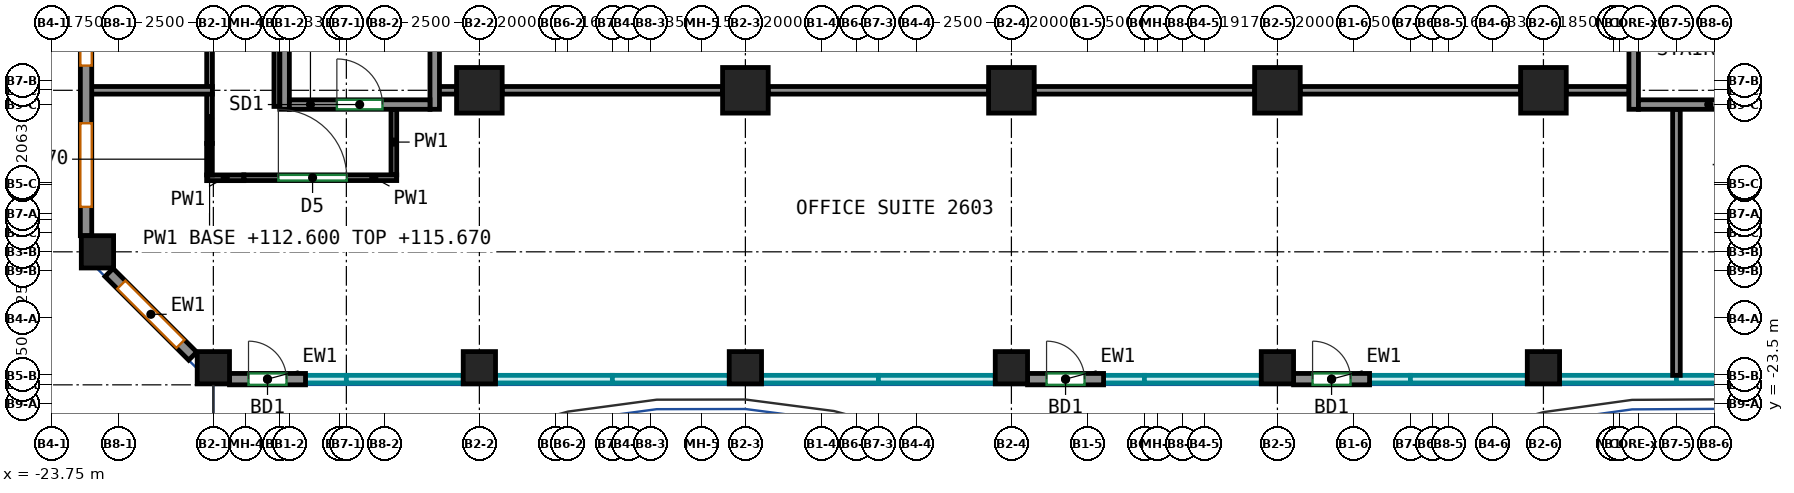
"""IFC4 building model, lengths in metres.
Left out: names, types, materials, properties, quantities, classifications, styles, units other than length and angle.
Written with IfcOpenShell. Run it as: python <this file> out.ifc"""

import sys

from ifc_helpers import new_model, si_unit, direction, frame, frame_2d, origin, origin_2d, place, context, subcontext, project, spatial, rectangle, extrude, source, transform, mapped, element, fill, save


model = new_model("IFC4")
c1 = context("Model", 3, precision=1e-05, world=origin(), true_north=direction((0.0, 1.0)))
c2 = subcontext(c1, "Body", "Model", "MODEL_VIEW")
j1 = project(units=[si_unit("LENGTHUNIT", "METRE"), si_unit("PLANEANGLEUNIT", "RADIAN")], contexts=[c1])
p1 = place(None, origin())
s1 = spatial("IfcSite", under=j1, at=p1, CompositionType="ELEMENT")
p2 = place(p1, origin())
s2 = spatial("IfcBuilding", under=s1, at=p2, CompositionType="ELEMENT")
p3 = place(p2, frame((0.0, 0.0, 112.6)))
s3 = spatial("IfcBuildingStorey", under=s2, at=p3, CompositionType="ELEMENT", Elevation=112.6)
m1 = source(origin(), c2, "Body", "SweptSolid", [
    extrude(rectangle(XDim=0.85, YDim=0.85, at=origin_2d()), origin(), (0.0, 0.0, 1.0), 3.72),
])
for number, where, z_axis, x_axis in (
    (1, (-22.55, -19.5, 0.0), (0.0, 0.0, 1.0), (1.0, 0.0, 0.0)),
    (2, (-19.5, -22.55, 0.0), (0.0, 0.0, 1.0), (1.0, 0.0, 0.0)),
    (3, (-12.5, -22.55, 0.0), (0.0, 0.0, 1.0), (1.0, 0.0, 0.0)),
):
    element("IfcColumn", number, at=place(p3, frame(where, z_axis=z_axis, x_axis=x_axis)), inside=s3, PredefinedType="COLUMN", context=c2, shape_type="MappedRepresentation", body=[
        mapped(m1, transform((0.0, 0.0, 0.0))),
    ])
m2 = source(origin(), c2, "Body", "SweptSolid", [
    extrude(rectangle(XDim=1.2, YDim=1.2, at=origin_2d()), origin(), (0.0, 0.0, 1.0), 3.72),
])
p4 = place(p3, frame((-12.5, -15.25, 0.0), z_axis=(0.0, 0.0, 1.0), x_axis=(1.0, 0.0, 0.0)))
e4 = element("IfcColumn", 4, at=p4, inside=s3, PredefinedType="COLUMN", context=c2, shape_type="MappedRepresentation", body=[
    mapped(m2, transform((0.0, 0.0, 0.0))),
])
p5 = place(p3, frame((-5.5, -22.55, 0.0), z_axis=(0.0, 0.0, 1.0), x_axis=(1.0, 0.0, 0.0)))
e5 = element("IfcColumn", 5, at=p5, inside=s3, PredefinedType="COLUMN", context=c2, shape_type="MappedRepresentation", body=[
    mapped(m1, transform((0.0, 0.0, 0.0))),
])
p6 = place(p3, frame((-5.5, -15.25, 0.0), z_axis=(0.0, 0.0, 1.0), x_axis=(1.0, 0.0, 0.0)))
e6 = element("IfcColumn", 6, at=p6, inside=s3, PredefinedType="COLUMN", context=c2, shape_type="MappedRepresentation", body=[
    mapped(m2, transform((0.0, 0.0, 0.0))),
])
p7 = place(p3, frame((1.5, -22.55, 0.0), z_axis=(0.0, 0.0, 1.0), x_axis=(1.0, 0.0, 0.0)))
e7 = element("IfcColumn", 7, at=p7, inside=s3, PredefinedType="COLUMN", context=c2, shape_type="MappedRepresentation", body=[
    mapped(m1, transform((0.0, 0.0, 0.0))),
])
p8 = place(p3, frame((1.5, -15.25, 0.0), z_axis=(0.0, 0.0, 1.0), x_axis=(1.0, 0.0, 0.0)))
e8 = element("IfcColumn", 8, at=p8, inside=s3, PredefinedType="COLUMN", context=c2, shape_type="MappedRepresentation", body=[
    mapped(m2, transform((0.0, 0.0, 0.0))),
])
p9 = place(p3, frame((8.5, -22.55, 0.0), z_axis=(0.0, 0.0, 1.0), x_axis=(1.0, 0.0, 0.0)))
e9 = element("IfcColumn", 9, at=p9, inside=s3, PredefinedType="COLUMN", context=c2, shape_type="MappedRepresentation", body=[
    mapped(m1, transform((0.0, 0.0, 0.0))),
])
p10 = place(p3, frame((8.5, -15.25, 0.0), z_axis=(0.0, 0.0, 1.0), x_axis=(1.0, 0.0, 0.0)))
e10 = element("IfcColumn", 10, at=p10, inside=s3, PredefinedType="COLUMN", context=c2, shape_type="MappedRepresentation", body=[
    mapped(m2, transform((0.0, 0.0, 0.0))),
])
p11 = place(p3, frame((15.5, -22.55, 0.0), z_axis=(0.0, 0.0, 1.0), x_axis=(1.0, 0.0, 0.0)))
e11 = element("IfcColumn", 11, at=p11, inside=s3, PredefinedType="COLUMN", context=c2, shape_type="MappedRepresentation", body=[
    mapped(m1, transform((0.0, 0.0, 0.0))),
])
p12 = place(p3, frame((15.5, -15.25, 0.0), z_axis=(0.0, 0.0, 1.0), x_axis=(1.0, 0.0, 0.0)))
e12 = element("IfcColumn", 12, at=p12, inside=s3, PredefinedType="COLUMN", context=c2, shape_type="MappedRepresentation", body=[
    mapped(m2, transform((0.0, 0.0, 0.0))),
])
m3 = source(origin(), c2, "Body", "SweptSolid", [
    extrude(rectangle(XDim=8.0, YDim=0.25, at=frame_2d((4.0, 0.0))), origin(), (0.0, 0.0, 1.0), 3.72),
])
for number, where, z_axis, x_axis in (
    (13, (-17.625, -15.75, 0.0), (0.0, 0.0, 1.0), (0.0, 1.0, 0.0)),
    (14, (-13.675, -15.75, 0.0), (0.0, 0.0, 1.0), (0.0, 1.0, 0.0)),
):
    element("IfcWall", number, at=place(p3, frame(where, z_axis=z_axis, x_axis=x_axis)), inside=s3, PredefinedType="SHEAR", context=c2, shape_type="MappedRepresentation", body=[
        mapped(m3, transform((0.0, 0.0, 0.0))),
    ])
m4 = source(origin(), c2, "Body", "SweptSolid", [
    extrude(rectangle(XDim=3.7, YDim=0.25, at=frame_2d((1.85, 0.0))), origin(), (0.0, 0.0, 1.0), 3.72),
])
p13 = place(p3, frame((-17.5, -15.625, 0.0), z_axis=(0.0, 0.0, 1.0), x_axis=(1.0, 0.0, 0.0)))
e15 = element("IfcWall", 15, at=p13, inside=s3, PredefinedType="SHEAR", context=c2, shape_type="MappedRepresentation", body=[
    mapped(m4, transform((0.0, 0.0, 0.0))),
])
p14 = place(p13, frame((1.25, 0.0, 0.0)))
e16 = element("IfcOpeningElement", 16, at=p14, cuts=e15, PredefinedType="OPENING", context=c2, shape_type="SweptSolid", body=[
    extrude(rectangle(XDim=1.2, YDim=2.1, at=frame_2d((0.6, 1.05))), frame((0.0, 0.135, 0.0), z_axis=(0.0, -1.0, 0.0), x_axis=(1.0, 0.0, 0.0)), (0.0, 0.0, 1.0), 0.27),
])
p15 = place(p3, frame((17.875, -15.75, 0.0), z_axis=(0.0, 0.0, 1.0), x_axis=(0.0, 1.0, 0.0)))
e17 = element("IfcWall", 17, at=p15, inside=s3, PredefinedType="SHEAR", context=c2, shape_type="MappedRepresentation", body=[
    mapped(m3, transform((0.0, 0.0, 0.0))),
])
p16 = place(p3, frame((18.0, -15.625, 0.0), z_axis=(0.0, 0.0, 1.0), x_axis=(1.0, 0.0, 0.0)))
e18 = element("IfcWall", 18, at=p16, inside=s3, PredefinedType="SHEAR", context=c2, shape_type="MappedRepresentation", body=[
    mapped(m4, transform((0.0, 0.0, 0.0))),
])
m5 = source(origin(), c2, "Body", "SweptSolid", [
    extrude(rectangle(XDim=2.0, YDim=0.3, at=frame_2d((1.0, 0.0))), origin(), (0.0, 0.0, 1.0), 3.72),
])
p17 = place(p3, frame((-19.075, -22.85, 0.0), z_axis=(0.0, 0.0, 1.0), x_axis=(1.0, 0.0, 0.0)))
e19 = element("IfcWall", 19, at=p17, inside=s3, PredefinedType="SOLIDWALL", context=c2, shape_type="MappedRepresentation", body=[
    mapped(m5, transform((0.0, 0.0, 0.0))),
])
p18 = place(p17, frame((0.5, 0.0, 0.0)))
e20 = element("IfcOpeningElement", 20, at=p18, cuts=e19, PredefinedType="OPENING", context=c2, shape_type="SweptSolid", body=[
    extrude(rectangle(XDim=1.0, YDim=2.1, at=frame_2d((0.5, 1.05))), frame((0.0, 0.16, 0.0), z_axis=(0.0, -1.0, 0.0), x_axis=(1.0, 0.0, 0.0)), (0.0, 0.0, 1.0), 0.32),
])
p19 = place(p3, frame((1.925, -22.85, 0.0), z_axis=(0.0, 0.0, 1.0), x_axis=(1.0, 0.0, 0.0)))
e21 = element("IfcWall", 21, at=p19, inside=s3, PredefinedType="SOLIDWALL", context=c2, shape_type="MappedRepresentation", body=[
    mapped(m5, transform((0.0, 0.0, 0.0))),
])
p20 = place(p19, frame((0.5, 0.0, 0.0)))
e22 = element("IfcOpeningElement", 22, at=p20, cuts=e21, PredefinedType="OPENING", context=c2, shape_type="SweptSolid", body=[
    extrude(rectangle(XDim=1.0, YDim=2.1, at=frame_2d((0.5, 1.05))), frame((0.0, 0.16, 0.0), z_axis=(0.0, -1.0, 0.0), x_axis=(1.0, 0.0, 0.0)), (0.0, 0.0, 1.0), 0.32),
])
p21 = place(p3, frame((8.925, -22.85, 0.0), z_axis=(0.0, 0.0, 1.0), x_axis=(1.0, 0.0, 0.0)))
e23 = element("IfcWall", 23, at=p21, inside=s3, PredefinedType="SOLIDWALL", context=c2, shape_type="MappedRepresentation", body=[
    mapped(m5, transform((0.0, 0.0, 0.0))),
])
p22 = place(p21, frame((0.5, 0.0, 0.0)))
e24 = element("IfcOpeningElement", 24, at=p22, cuts=e23, PredefinedType="OPENING", context=c2, shape_type="SweptSolid", body=[
    extrude(rectangle(XDim=1.0, YDim=2.1, at=frame_2d((0.5, 1.05))), frame((0.0, 0.16, 0.0), z_axis=(0.0, -1.0, 0.0), x_axis=(1.0, 0.0, 0.0)), (0.0, 0.0, 1.0), 0.32),
])
m6 = source(origin(), c2, "Body", "SweptSolid", [
    extrude(rectangle(XDim=11.15, YDim=0.3, at=frame_2d((5.575, 0.0))), origin(), (0.0, 0.0, 1.0), 3.72),
])
p23 = place(p3, frame((-22.85, -7.925, 0.0), z_axis=(0.0, 0.0, 1.0), x_axis=(0.0, -1.0, 0.0)))
e25 = element("IfcWall", 25, at=p23, inside=s3, PredefinedType="SOLIDWALL", context=c2, shape_type="MappedRepresentation", body=[
    mapped(m6, transform((0.0, 0.0, 0.0))),
])
p24 = place(p23, frame((0.758, 0.0, 0.7)))
e26 = element("IfcOpeningElement", 26, at=p24, cuts=e25, PredefinedType="OPENING", context=c2, shape_type="SweptSolid", body=[
    extrude(rectangle(XDim=2.2, YDim=2.25, at=frame_2d((1.1, 1.125))), frame((0.0, 0.16, 0.0), z_axis=(0.0, -1.0, 0.0), x_axis=(1.0, 0.0, 0.0)), (0.0, 0.0, 1.0), 0.32),
])
p25 = place(p23, frame((4.475, 0.0, 0.7)))
e27 = element("IfcOpeningElement", 27, at=p25, cuts=e25, PredefinedType="OPENING", context=c2, shape_type="SweptSolid", body=[
    extrude(rectangle(XDim=2.2, YDim=2.25, at=frame_2d((1.1, 1.125))), frame((0.0, 0.16, 0.0), z_axis=(0.0, -1.0, 0.0), x_axis=(1.0, 0.0, 0.0)), (0.0, 0.0, 1.0), 0.32),
])
p26 = place(p23, frame((8.192, 0.0, 0.7)))
e28 = element("IfcOpeningElement", 28, at=p26, cuts=e25, PredefinedType="OPENING", context=c2, shape_type="SweptSolid", body=[
    extrude(rectangle(XDim=2.2, YDim=2.25, at=frame_2d((1.1, 1.125))), frame((0.0, 0.16, 0.0), z_axis=(0.0, -1.0, 0.0), x_axis=(1.0, 0.0, 0.0)), (0.0, 0.0, 1.0), 0.32),
])
m7 = source(origin(), c2, "Body", "SweptSolid", [
    extrude(rectangle(XDim=3.111, YDim=0.3, at=frame_2d((1.556, 0.0))), origin(), (0.0, 0.0, 1.0), 3.72),
])
p27 = place(p3, frame((-22.244, -20.044, 0.0), z_axis=(0.0, 0.0, 1.0), x_axis=(0.707106781187, -0.707106781187, 0.0)))
e29 = element("IfcWall", 29, at=p27, inside=s3, PredefinedType="SOLIDWALL", context=c2, shape_type="MappedRepresentation", body=[
    mapped(m7, transform((0.0, 0.0, 0.0))),
])
p28 = place(p27, frame((0.456, 0.0, 0.7)))
e30 = element("IfcOpeningElement", 30, at=p28, cuts=e29, PredefinedType="OPENING", context=c2, shape_type="SweptSolid", body=[
    extrude(rectangle(XDim=2.2, YDim=2.25, at=frame_2d((1.1, 1.125))), frame((0.0, 0.16, 0.0), z_axis=(0.0, -1.0, 0.0), x_axis=(1.0, 0.0, 0.0)), (0.0, 0.0, 1.0), 0.32),
])
p29 = place(p3, frame((-19.6, -15.16, 0.0), z_axis=(0.0, 0.0, 1.0), x_axis=(0.0, 1.0, 0.0)))
e31 = element("IfcWall", 31, at=p29, inside=s3, PredefinedType="PARTITIONING", context=c2, shape_type="SweptSolid", body=[
    extrude(rectangle(XDim=19.51, YDim=0.15, at=frame_2d((9.755, 0.0))), origin(), (0.0, 0.0, 1.0), 3.07),
])
p30 = place(p29, frame((2.801, 0.0, 0.0)))
e32 = element("IfcOpeningElement", 32, at=p30, cuts=e31, PredefinedType="OPENING", context=c2, shape_type="SweptSolid", body=[
    extrude(rectangle(XDim=1.0, YDim=2.1, at=frame_2d((0.5, 1.05))), frame((0.0, 0.085, 0.0), z_axis=(0.0, -1.0, 0.0), x_axis=(1.0, 0.0, 0.0)), (0.0, 0.0, 1.0), 0.17),
])
p31 = place(p3, frame((-17.83, -15.675, 0.0), z_axis=(0.0, 0.0, 1.0), x_axis=(0.0, 1.0, 0.0)))
e33 = element("IfcWall", 33, at=p31, inside=s3, PredefinedType="PARTITIONING", context=c2, shape_type="SweptSolid", body=[
    extrude(rectangle(XDim=11.96, YDim=0.15, at=frame_2d((5.98, 0.0))), origin(), (0.0, 0.0, 1.0), 3.72),
])
p32 = place(p31, frame((8.249, 0.0, 0.0)))
e34 = element("IfcOpeningElement", 34, at=p32, cuts=e33, PredefinedType="OPENING", context=c2, shape_type="SweptSolid", body=[
    extrude(rectangle(XDim=1.8, YDim=2.1, at=frame_2d((0.9, 1.05))), frame((0.0, 0.085, 0.0), z_axis=(0.0, -1.0, 0.0), x_axis=(1.0, 0.0, 0.0)), (0.0, 0.0, 1.0), 0.17),
])
p33 = place(p3, frame((-19.6, -16.648, 0.0), z_axis=(0.0, 0.0, 1.0), x_axis=(0.0, 1.0, 0.0)))
e35 = element("IfcWall", 35, at=p33, inside=s3, PredefinedType="PARTITIONING", context=c2, shape_type="SweptSolid", body=[
    extrude(rectangle(XDim=1.308, YDim=0.15, at=frame_2d((0.654, 0.0))), origin(), (0.0, 0.0, 1.0), 3.07),
])
p34 = place(p3, frame((-14.75, -17.475, 0.0), z_axis=(0.0, 0.0, 1.0), x_axis=(0.0, 1.0, 0.0)))
e36 = element("IfcWall", 36, at=p34, inside=s3, PredefinedType="PARTITIONING", context=c2, shape_type="SweptSolid", body=[
    extrude(rectangle(XDim=1.725, YDim=0.15, at=frame_2d((0.863, 0.0))), origin(), (0.0, 0.0, 1.0), 3.72),
])
p35 = place(p3, frame((-18.698, -17.55, 0.0), z_axis=(0.0, 0.0, 1.0), x_axis=(1.0, 0.0, 0.0)))
e37 = element("IfcWall", 37, at=p35, inside=s3, PredefinedType="PARTITIONING", context=c2, shape_type="SweptSolid", body=[
    extrude(rectangle(XDim=4.023, YDim=0.15, at=frame_2d((2.011, 0.0))), origin(), (0.0, 0.0, 1.0), 3.72),
])
p36 = place(p35, frame((0.909, 0.0, 0.0)))
e38 = element("IfcOpeningElement", 38, at=p36, cuts=e37, PredefinedType="OPENING", context=c2, shape_type="SweptSolid", body=[
    extrude(rectangle(XDim=1.8, YDim=2.1, at=frame_2d((0.9, 1.05))), frame((0.0, 0.085, 0.0), z_axis=(0.0, -1.0, 0.0), x_axis=(1.0, 0.0, 0.0)), (0.0, 0.0, 1.0), 0.17),
])
p37 = place(p3, frame((-19.677, -17.552, 0.0), z_axis=(0.0, 0.0, 1.0), x_axis=(1.0, 0.0, 0.0)))
e39 = element("IfcWall", 39, at=p37, inside=s3, PredefinedType="PARTITIONING", context=c2, shape_type="SweptSolid", body=[
    extrude(rectangle(XDim=0.979, YDim=0.15, at=frame_2d((0.49, 0.0))), origin(), (0.0, 0.0, 1.0), 3.72),
])
p38 = place(p3, frame((-19.602, -16.648, 0.0), z_axis=(0.0, 0.0, 1.0), x_axis=(0.0, -1.0, 0.0)))
e40 = element("IfcWall", 40, at=p38, inside=s3, PredefinedType="PARTITIONING", context=c2, shape_type="SweptSolid", body=[
    extrude(rectangle(XDim=0.829, YDim=0.15, at=frame_2d((0.415, 0.0))), origin(), (0.0, 0.0, 1.0), 3.07),
])
p39 = place(p3, frame((-22.75, -15.25, 0.0), z_axis=(0.0, 0.0, 1.0), x_axis=(1.0, 0.0, 0.0)))
e41 = element("IfcWall", 41, at=p39, inside=s3, PredefinedType="PARTITIONING", context=c2, shape_type="SweptSolid", body=[
    extrude(rectangle(XDim=3.224, YDim=0.2, at=frame_2d((1.612, 0.0))), origin(), (0.0, 0.0, 1.0), 3.72),
])
p40 = place(p3, frame((16.1, -15.25, 0.0), z_axis=(0.0, 0.0, 1.0), x_axis=(1.0, 0.0, 0.0)))
e42 = element("IfcWall", 42, at=p40, inside=s3, PredefinedType="PARTITIONING", context=c2, shape_type="SweptSolid", body=[
    extrude(rectangle(XDim=1.65, YDim=0.2, at=frame_2d((0.825, 0.0))), origin(), (0.0, 0.0, 1.0), 3.72),
])
for number, where, z_axis, x_axis in (
    (43, (9.1, -15.25, 0.0), (0.0, 0.0, 1.0), (1.0, 0.0, 0.0)),
    (44, (2.1, -15.25, 0.0), (0.0, 0.0, 1.0), (1.0, 0.0, 0.0)),
    (45, (-4.9, -15.25, 0.0), (0.0, 0.0, 1.0), (1.0, 0.0, 0.0)),
    (46, (-11.9, -15.25, 0.0), (0.0, 0.0, 1.0), (1.0, 0.0, 0.0)),
):
    element("IfcWall", number, at=place(p3, frame(where, z_axis=z_axis, x_axis=x_axis)), inside=s3, PredefinedType="PARTITIONING", context=c2, shape_type="SweptSolid", body=[
        extrude(rectangle(XDim=5.8, YDim=0.2, at=frame_2d((2.9, 0.0))), origin(), (0.0, 0.0, 1.0), 3.72),
    ])
p41 = place(p3, frame((-13.6, -15.25, 0.0), z_axis=(0.0, 0.0, 1.0), x_axis=(1.0, 0.0, 0.0)))
e47 = element("IfcWall", 47, at=p41, inside=s3, PredefinedType="PARTITIONING", context=c2, shape_type="SweptSolid", body=[
    extrude(rectangle(XDim=0.5, YDim=0.2, at=frame_2d((0.25, 0.0))), origin(), (0.0, 0.0, 1.0), 3.72),
])
p42 = place(p3, frame((19.0, -22.75, 0.0), z_axis=(0.0, 0.0, 1.0), x_axis=(0.0, 1.0, 0.0)))
e48 = element("IfcWall", 48, at=p42, inside=s3, PredefinedType="PARTITIONING", context=c2, shape_type="SweptSolid", body=[
    extrude(rectangle(XDim=7.0, YDim=0.2, at=frame_2d((3.5, 0.0))), origin(), (0.0, 0.0, 1.0), 3.72),
])
p43 = place(p18, origin())
e49 = element("IfcDoor", 49, at=p43, inside=s3, OperationType="SINGLE_SWING_LEFT", PredefinedType="DOOR", context=c2, shape_type="SweptSolid", body=[
    extrude(rectangle(XDim=1.0, YDim=2.1, at=frame_2d((0.5, 1.05))), frame((0.0, 0.025, 0.0), z_axis=(0.0, -1.0, 0.0), x_axis=(1.0, 0.0, 0.0)), (0.0, 0.0, 1.0), 0.05),
])
fill(e20, e49)
p44 = place(p20, origin())
e50 = element("IfcDoor", 50, at=p44, inside=s3, OperationType="SINGLE_SWING_LEFT", PredefinedType="DOOR", context=c2, shape_type="SweptSolid", body=[
    extrude(rectangle(XDim=1.0, YDim=2.1, at=frame_2d((0.5, 1.05))), frame((0.0, 0.025, 0.0), z_axis=(0.0, -1.0, 0.0), x_axis=(1.0, 0.0, 0.0)), (0.0, 0.0, 1.0), 0.05),
])
fill(e22, e50)
p45 = place(p22, origin())
e51 = element("IfcDoor", 51, at=p45, inside=s3, OperationType="SINGLE_SWING_LEFT", PredefinedType="DOOR", context=c2, shape_type="SweptSolid", body=[
    extrude(rectangle(XDim=1.0, YDim=2.1, at=frame_2d((0.5, 1.05))), frame((0.0, 0.025, 0.0), z_axis=(0.0, -1.0, 0.0), x_axis=(1.0, 0.0, 0.0)), (0.0, 0.0, 1.0), 0.05),
])
fill(e24, e51)
p46 = place(p25, origin())
e52 = element("IfcWindow", 52, at=p46, inside=s3, PartitioningType="SINGLE_PANEL", PredefinedType="WINDOW", context=c2, shape_type="SweptSolid", body=[
    extrude(rectangle(XDim=2.2, YDim=2.25, at=frame_2d((1.1, 1.125))), frame((0.0, 0.03, 0.0), z_axis=(0.0, -1.0, 0.0), x_axis=(1.0, 0.0, 0.0)), (0.0, 0.0, 1.0), 0.06),
])
fill(e27, e52)
p47 = place(p26, origin())
e53 = element("IfcWindow", 53, at=p47, inside=s3, PartitioningType="SINGLE_PANEL", PredefinedType="WINDOW", context=c2, shape_type="SweptSolid", body=[
    extrude(rectangle(XDim=2.2, YDim=2.25, at=frame_2d((1.1, 1.125))), frame((0.0, 0.03, 0.0), z_axis=(0.0, -1.0, 0.0), x_axis=(1.0, 0.0, 0.0)), (0.0, 0.0, 1.0), 0.06),
])
fill(e28, e53)
p48 = place(p28, origin())
e54 = element("IfcWindow", 54, at=p48, inside=s3, PartitioningType="SINGLE_PANEL", PredefinedType="WINDOW", context=c2, shape_type="SweptSolid", body=[
    extrude(rectangle(XDim=2.2, YDim=2.25, at=frame_2d((1.1, 1.125))), frame((0.0, 0.03, 0.0), z_axis=(0.0, -1.0, 0.0), x_axis=(1.0, 0.0, 0.0)), (0.0, 0.0, 1.0), 0.06),
])
fill(e30, e54)
p49 = place(p14, origin())
e55 = element("IfcDoor", 55, at=p49, inside=s3, OperationType="DOUBLE_DOOR_SINGLE_SWING", PredefinedType="DOOR", context=c2, shape_type="SweptSolid", body=[
    extrude(rectangle(XDim=1.2, YDim=2.1, at=frame_2d((0.6, 1.05))), frame((0.0, 0.025, 0.0), z_axis=(0.0, -1.0, 0.0), x_axis=(1.0, 0.0, 0.0)), (0.0, 0.0, 1.0), 0.05),
])
fill(e16, e55)
p50 = place(p36, origin())
e56 = element("IfcDoor", 56, at=p50, inside=s3, OperationType="DOUBLE_DOOR_SINGLE_SWING", PredefinedType="DOOR", context=c2, shape_type="SweptSolid", body=[
    extrude(rectangle(XDim=1.8, YDim=2.1, at=frame_2d((0.9, 1.05))), frame((0.0, 0.025, 0.0), z_axis=(0.0, -1.0, 0.0), x_axis=(1.0, 0.0, 0.0)), (0.0, 0.0, 1.0), 0.05),
])
fill(e38, e56)
save(model, sys.argv[1])
